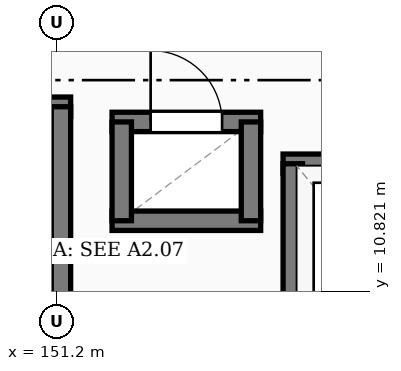
"""IFC4 building model, lengths in metres.
Left out: names, types, materials, properties, quantities, classifications, styles, units other than length and angle.
Written with IfcOpenShell. Run it as: python <this file> out.ifc"""

import sys

from ifc_helpers import new_model, si_unit, direction, frame, frame_2d, origin, place, context, subcontext, project, spatial, rectangle, extrude, element, fill, save


model = new_model("IFC4")
c1 = context("Model", 3, precision=1e-05, world=origin(), true_north=direction((0.0, 1.0)))
c2 = subcontext(c1, "Body", "Model", "MODEL_VIEW")
j1 = project(units=[si_unit("LENGTHUNIT", "METRE"), si_unit("PLANEANGLEUNIT", "RADIAN")], contexts=[c1])
p1 = place(None, origin())
s1 = spatial("IfcSite", under=j1, at=p1, CompositionType="ELEMENT")
p2 = place(p1, origin())
s2 = spatial("IfcBuilding", under=s1, at=p2, CompositionType="ELEMENT")
p3 = place(p2, origin())
s3 = spatial("IfcBuildingStorey", under=s2, at=p3, CompositionType="ELEMENT", Elevation=0.0)
p4 = place(p3, frame((143.153, 13.25, 0.0), z_axis=(0.0, 0.0, 1.0), x_axis=(1.0, 0.0, 0.0)))
e1 = element("IfcWall", 1, at=p4, inside=s3, PredefinedType="SOLIDWALL", context=c2, shape_type="SweptSolid", body=[
    extrude(rectangle(XDim=8.225, YDim=0.255, at=frame_2d((4.112, 0.0))), origin(), (0.0, 0.0, 1.0), 3.64),
])
p5 = place(p4, frame((0.35, 0.0, 0.0)))
e2 = element("IfcOpeningElement", 2, at=p5, cuts=e1, PredefinedType="OPENING", context=c2, shape_type="SweptSolid", body=[
    extrude(rectangle(XDim=1.25, YDim=2.2, at=frame_2d((0.625, 1.1))), frame((0.0, 0.137, 0.0), z_axis=(0.0, -1.0, 0.0), x_axis=(1.0, 0.0, 0.0)), (0.0, 0.0, 1.0), 0.275),
])
p6 = place(p3, frame((151.25, 9.38, 0.0), z_axis=(0.0, 0.0, 1.0), x_axis=(0.0, 1.0, 0.0)))
e3 = element("IfcWall", 3, at=p6, inside=s3, PredefinedType="SOLIDWALL", context=c2, shape_type="SweptSolid", body=[
    extrude(rectangle(XDim=3.87, YDim=0.255, at=frame_2d((1.935, 0.0))), origin(), (0.0, 0.0, 1.0), 3.64),
])
p7 = place(p3, frame((154.173, 12.5, 0.0), z_axis=(0.0, 0.0, 1.0), x_axis=(1.0, 0.0, 0.0)))
e4 = element("IfcWall", 4, at=p7, inside=s3, PredefinedType="SOLIDWALL", context=c2, shape_type="SweptSolid", body=[
    extrude(rectangle(XDim=2.455, YDim=0.255, at=frame_2d((1.228, 0.0))), origin(), (0.0, 0.0, 1.0), 3.64),
])
p8 = place(p7, frame((0.677, 0.0, 0.0)))
e5 = element("IfcOpeningElement", 5, at=p8, cuts=e4, PredefinedType="OPENING", context=c2, shape_type="SweptSolid", body=[
    extrude(rectangle(XDim=1.1, YDim=2.15, at=frame_2d((0.55, 1.075))), frame((0.0, 0.137, 0.0), z_axis=(0.0, -1.0, 0.0), x_axis=(1.0, 0.0, 0.0)), (0.0, 0.0, 1.0), 0.275),
])
p9 = place(p3, frame((154.3, 9.9, 0.0), z_axis=(0.0, 0.0, 1.0), x_axis=(0.0, 1.0, 0.0)))
e6 = element("IfcWall", 6, at=p9, inside=s3, PredefinedType="SOLIDWALL", context=c2, shape_type="SweptSolid", body=[
    extrude(rectangle(XDim=2.6, YDim=0.255, at=frame_2d((1.3, 0.0))), origin(), (0.0, 0.0, 1.0), 3.64),
])
p10 = place(p3, frame((151.923, 11.75, 0.0), z_axis=(0.0, 0.0, 1.0), x_axis=(1.0, 0.0, 0.0)))
e7 = element("IfcWall", 7, at=p10, inside=s3, PredefinedType="SOLIDWALL", context=c2, shape_type="SweptSolid", body=[
    extrude(rectangle(XDim=1.955, YDim=0.255, at=frame_2d((0.978, 0.0))), origin(), (0.0, 0.0, 1.0), 3.64),
])
p11 = place(p3, frame((151.923, 13.05, 0.0), z_axis=(0.0, 0.0, 1.0), x_axis=(1.0, 0.0, 0.0)))
e8 = element("IfcWall", 8, at=p11, inside=s3, PredefinedType="SOLIDWALL", context=c2, shape_type="SweptSolid", body=[
    extrude(rectangle(XDim=1.955, YDim=0.255, at=frame_2d((0.978, 0.0))), origin(), (0.0, 0.0, 1.0), 3.64),
])
p12 = place(p11, frame((0.508, 0.0, 0.0)))
e9 = element("IfcOpeningElement", 9, at=p12, cuts=e8, PredefinedType="OPENING", context=c2, shape_type="SweptSolid", body=[
    extrude(rectangle(XDim=0.94, YDim=2.1, at=frame_2d((0.47, 1.05))), frame((0.0, 0.137, 0.0), z_axis=(0.0, -1.0, 0.0), x_axis=(1.0, 0.0, 0.0)), (0.0, 0.0, 1.0), 0.275),
])
for number, where, z_axis, x_axis in (
    (10, (152.05, 11.75, 0.0), (0.0, 0.0, 1.0), (0.0, 1.0, 0.0)),
    (11, (153.75, 11.75, 0.0), (0.0, 0.0, 1.0), (0.0, 1.0, 0.0)),
):
    element("IfcWall", number, at=place(p3, frame(where, z_axis=z_axis, x_axis=x_axis)), inside=s3, PredefinedType="SOLIDWALL", context=c2, shape_type="SweptSolid", body=[
        extrude(rectangle(XDim=1.3, YDim=0.255, at=frame_2d((0.65, 0.0))), origin(), (0.0, 0.0, 1.0), 3.64),
    ])
p13 = place(p12, origin())
e12 = element("IfcDoor", 12, at=p13, inside=s3, OperationType="SINGLE_SWING_LEFT", PredefinedType="DOOR", context=c2, shape_type="SweptSolid", body=[
    extrude(rectangle(XDim=0.94, YDim=2.1, at=frame_2d((0.47, 1.05))), frame((0.0, 0.025, 0.0), z_axis=(0.0, -1.0, 0.0), x_axis=(1.0, 0.0, 0.0)), (0.0, 0.0, 1.0), 0.05),
])
fill(e9, e12)
save(model, sys.argv[1])
